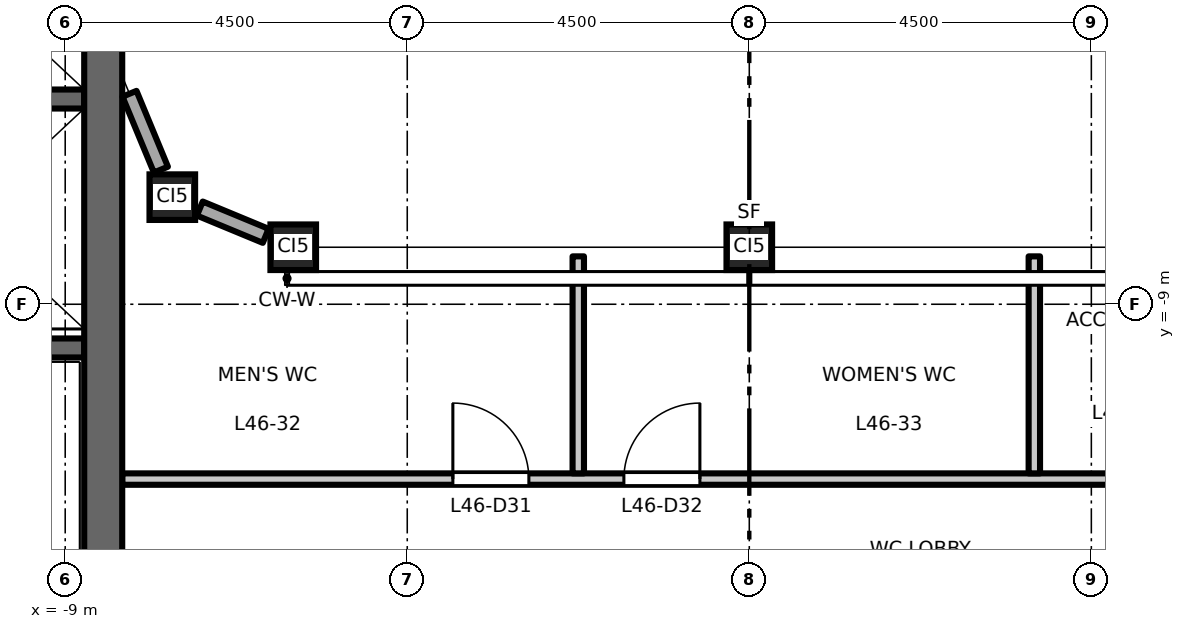
"""IFC4 building model, lengths in metres.
Left out: names, types, materials, properties, quantities, classifications, styles, units other than length and angle.
Written with IfcOpenShell. Run it as: python <this file> out.ifc"""

import sys

from ifc_helpers import new_model, si_unit, direction, frame, frame_2d, origin, origin_2d, place, context, subcontext, project, spatial, rectangle, hollow_rectangle, extrude, element, fill, save


model = new_model("IFC4")
c1 = context("Model", 3, precision=1e-05, world=origin(), true_north=direction((0.0, 1.0)))
c2 = subcontext(c1, "Body", "Model", "MODEL_VIEW")
j1 = project(units=[si_unit("LENGTHUNIT", "METRE"), si_unit("PLANEANGLEUNIT", "RADIAN")], contexts=[c1])
p1 = place(None, origin())
s1 = spatial("IfcSite", under=j1, at=p1, CompositionType="ELEMENT")
p2 = place(p1, origin())
s2 = spatial("IfcBuilding", under=s1, at=p2, CompositionType="ELEMENT")
p3 = place(p2, frame((0.0, 0.0, 215.2)))
s3 = spatial("IfcBuildingStorey", under=s2, at=p3, CompositionType="ELEMENT", Elevation=215.2)
for number, where, z_axis, x_axis in (
    (1, (-7.591, -7.591, 0.0), (0.0, 0.0, 1.0), (1.0, 0.0, 0.0)),
    (2, (-6.0, -8.25, 0.0), (0.0, 0.0, 1.0), (1.0, 0.0, 0.0)),
    (3, (0.0, -8.25, 0.0), (0.0, 0.0, 1.0), (1.0, 0.0, 0.0)),
):
    element("IfcColumn", number, at=place(p3, frame(where, z_axis=z_axis, x_axis=x_axis)), inside=s3, PredefinedType="COLUMN", context=c2, shape_type="SweptSolid", body=[
        extrude(hollow_rectangle(XDim=0.6, YDim=0.6, WallThickness=0.032, at=origin_2d()), origin(), (0.0, 0.0, 1.0), 4.5),
    ])
p4 = place(p3, frame((-8.75, -6.3, 0.0), z_axis=(0.0, 0.0, 1.0), x_axis=(-1.0, 0.0, 0.0)))
e4 = element("IfcWall", 4, at=p4, inside=s3, PredefinedType="SHEAR", context=c2, shape_type="SweptSolid", body=[
    extrude(rectangle(XDim=3.1, YDim=0.25, at=frame_2d((1.55, 0.0))), origin(), (0.0, 0.0, 1.0), 4.35),
])
p5 = place(p3, frame((-8.75, -9.575, 0.0), z_axis=(0.0, 0.0, 1.0), x_axis=(-1.0, 0.0, 0.0)))
e5 = element("IfcWall", 5, at=p5, inside=s3, PredefinedType="SHEAR", context=c2, shape_type="SweptSolid", body=[
    extrude(rectangle(XDim=8.0, YDim=0.25, at=frame_2d((4.0, 0.0))), origin(), (0.0, 0.0, 1.0), 4.35),
])
p6 = place(p5, frame((6.65, 0.0, 0.0)))
e6 = element("IfcOpeningElement", 6, at=p6, cuts=e5, PredefinedType="OPENING", context=c2, shape_type="SweptSolid", body=[
    extrude(rectangle(XDim=1.1, YDim=2.1, at=frame_2d((0.55, 1.05))), frame((0.0, 0.135, 0.0), z_axis=(0.0, -1.0, 0.0), x_axis=(1.0, 0.0, 0.0)), (0.0, 0.0, 1.0), 0.27),
])
p7 = place(p3, frame((-8.5, -13.0, 0.0), z_axis=(0.0, 0.0, 1.0), x_axis=(0.0, 1.0, 0.0)))
e7 = element("IfcWall", 7, at=p7, inside=s3, PredefinedType="SHEAR", context=c2, shape_type="SweptSolid", body=[
    extrude(rectangle(XDim=26.0, YDim=0.5, at=frame_2d((13.0, 0.0))), origin(), (0.0, 0.0, 1.0), 4.35),
])
p8 = place(p3, frame((-8.154, -6.231, 0.0), z_axis=(0.0, 0.0, 1.0), x_axis=(0.382704496366, -0.923870807235, 0.0)))
e8 = element("IfcWall", 8, at=p8, inside=s3, PredefinedType="STANDARD", context=c2, shape_type="SweptSolid", body=[
    extrude(rectangle(XDim=1.08, YDim=0.2, at=frame_2d((0.54, 0.0))), origin(), (0.0, 0.0, 1.0), 3.918),
])
p9 = place(p3, frame((-7.229, -7.741, 0.0), z_axis=(0.0, 0.0, 1.0), x_axis=(0.923829670615, -0.382803787458, 0.0)))
e9 = element("IfcWall", 9, at=p9, inside=s3, PredefinedType="STANDARD", context=c2, shape_type="SweptSolid", body=[
    extrude(rectangle(XDim=0.938, YDim=0.2, at=frame_2d((0.469, 0.0))), origin(), (0.0, 0.0, 1.0), 3.918),
])
p10 = place(p3, frame((-8.25, -11.3, 0.0), z_axis=(0.0, 0.0, 1.0), x_axis=(1.0, 0.0, 0.0)))
e10 = element("IfcWall", 10, at=p10, inside=s3, PredefinedType="PARTITIONING", context=c2, shape_type="SweptSolid", body=[
    extrude(rectangle(XDim=14.79, YDim=0.15, at=frame_2d((7.395, 0.0))), origin(), (0.0, 0.0, 1.0), 4.35),
])
p11 = place(p10, frame((4.35, 0.0, 0.0)))
e11 = element("IfcOpeningElement", 11, at=p11, cuts=e10, PredefinedType="OPENING", context=c2, shape_type="SweptSolid", body=[
    extrude(rectangle(XDim=1.0, YDim=2.1, at=frame_2d((0.5, 1.05))), frame((0.0, 0.085, 0.0), z_axis=(0.0, -1.0, 0.0), x_axis=(1.0, 0.0, 0.0)), (0.0, 0.0, 1.0), 0.17),
])
p12 = place(p10, frame((6.6, 0.0, 0.0)))
e12 = element("IfcOpeningElement", 12, at=p12, cuts=e10, PredefinedType="OPENING", context=c2, shape_type="SweptSolid", body=[
    extrude(rectangle(XDim=1.0, YDim=2.1, at=frame_2d((0.5, 1.05))), frame((0.0, 0.085, 0.0), z_axis=(0.0, -1.0, 0.0), x_axis=(1.0, 0.0, 0.0)), (0.0, 0.0, 1.0), 0.17),
])
p13 = place(p10, frame((13.14, 0.0, 0.0)))
e13 = element("IfcOpeningElement", 13, at=p13, cuts=e10, PredefinedType="OPENING", context=c2, shape_type="SweptSolid", body=[
    extrude(rectangle(XDim=1.0, YDim=2.1, at=frame_2d((0.5, 1.05))), frame((0.0, 0.085, 0.0), z_axis=(0.0, -1.0, 0.0), x_axis=(1.0, 0.0, 0.0)), (0.0, 0.0, 1.0), 0.17),
])
for number, where, z_axis, x_axis in (
    (14, (-2.25, -11.225, 0.0), (0.0, 0.0, 1.0), (0.0, 1.0, 0.0)),
    (15, (3.75, -11.225, 0.0), (0.0, 0.0, 1.0), (0.0, 1.0, 0.0)),
):
    element("IfcWall", number, at=place(p3, frame(where, z_axis=z_axis, x_axis=x_axis)), inside=s3, PredefinedType="PARTITIONING", context=c2, shape_type="SweptSolid", body=[
        extrude(rectangle(XDim=2.855, YDim=0.15, at=frame_2d((1.427, 0.0))), origin(), (0.0, 0.0, 1.0), 4.35),
    ])
p14 = place(p11, origin())
e16 = element("IfcDoor", 16, at=p14, inside=s3, OperationType="SINGLE_SWING_LEFT", PredefinedType="DOOR", context=c2, shape_type="SweptSolid", body=[
    extrude(rectangle(XDim=1.0, YDim=2.1, at=frame_2d((0.5, 1.05))), frame((0.0, 0.025, 0.0), z_axis=(0.0, -1.0, 0.0), x_axis=(1.0, 0.0, 0.0)), (0.0, 0.0, 1.0), 0.05),
])
fill(e11, e16)
p15 = place(p12, origin())
e17 = element("IfcDoor", 17, at=p15, inside=s3, OperationType="SINGLE_SWING_RIGHT", PredefinedType="DOOR", context=c2, shape_type="SweptSolid", body=[
    extrude(rectangle(XDim=1.0, YDim=2.1, at=frame_2d((0.5, 1.05))), frame((0.0, 0.025, 0.0), z_axis=(0.0, -1.0, 0.0), x_axis=(1.0, 0.0, 0.0)), (0.0, 0.0, 1.0), 0.05),
])
fill(e12, e17)
save(model, sys.argv[1])
